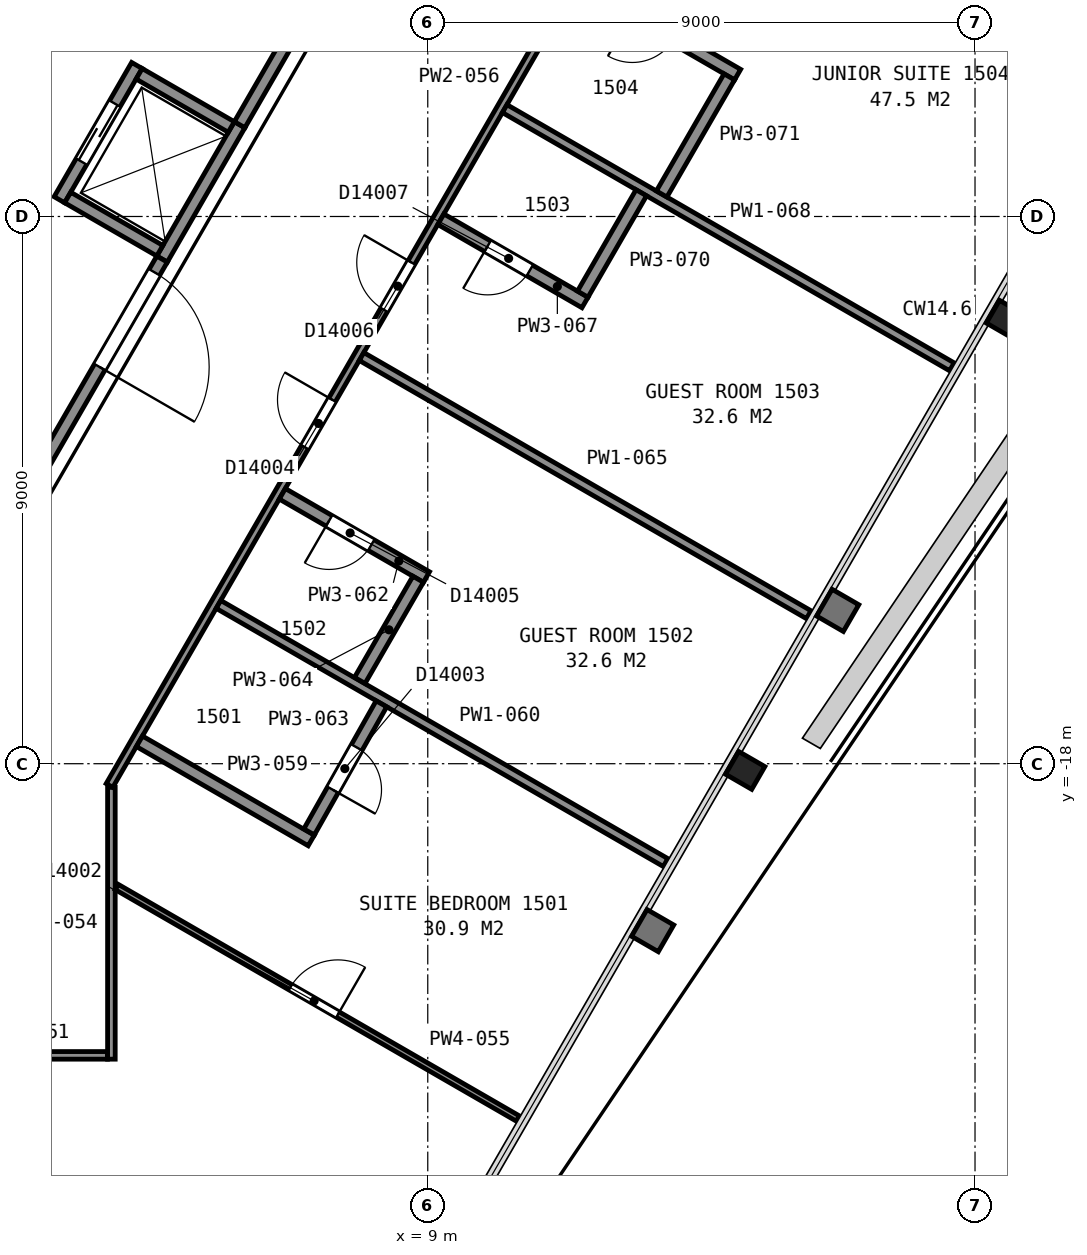
"""IFC4 building model, lengths in metres.
Left out: names, types, materials, properties, quantities, classifications, styles, units other than length and angle.
Written with IfcOpenShell. Run it as: python <this file> out.ifc"""

import sys

from ifc_helpers import new_model, si_unit, direction, frame, frame_2d, origin, origin_2d, place, context, subcontext, project, spatial, rectangle, i_section, extrude, element, fill, save


model = new_model("IFC4")
c1 = context("Model", 3, precision=1e-05, world=origin(), true_north=direction((0.0, 1.0)))
c2 = subcontext(c1, "Body", "Model", "MODEL_VIEW")
j1 = project(units=[si_unit("LENGTHUNIT", "METRE"), si_unit("PLANEANGLEUNIT", "RADIAN")], contexts=[c1])
p1 = place(None, origin())
s1 = spatial("IfcSite", under=j1, at=p1, CompositionType="ELEMENT")
p2 = place(p1, origin())
s2 = spatial("IfcBuilding", under=s1, at=p2, CompositionType="ELEMENT")
p3 = place(p2, frame((0.0, 0.0, 69.2)))
s3 = spatial("IfcBuildingStorey", under=s2, at=p3, CompositionType="ELEMENT", Elevation=69.2)
for number, where, z_axis, x_axis in (
    (1, (14.22, -18.11, 0.0), (0.0, 0.0, 1.0), (-0.5, -0.866, 0.0)),
    (2, (18.51, -10.69, 0.0), (0.0, 0.0, 1.0), (-0.5, -0.866, 0.0)),
):
    element("IfcColumn", number, at=place(p3, frame(where, z_axis=z_axis, x_axis=x_axis)), inside=s3, PredefinedType="COLUMN", context=c2, shape_type="SweptSolid", body=[
        extrude(i_section(OverallWidth=0.432, OverallDepth=0.498, WebThickness=0.056, FlangeThickness=0.089, FilletRadius=0.015, at=origin_2d()), origin(), (0.0, 0.0, 1.0), 3.575),
    ])
p4 = place(p3, frame((4.63, -9.7, 0.0), z_axis=(0.0, 0.0, 1.0), x_axis=(0.500062241894, 0.865989465428, 0.0)))
e3 = element("IfcWall", 3, at=p4, inside=s3, PredefinedType="PARTITIONING", context=c2, shape_type="SweptSolid", body=[
    extrude(rectangle(XDim=2.55, YDim=0.2, at=frame_2d((1.275, 0.0))), origin(), (0.0, 0.0, 1.0), 3.6),
])
p5 = place(p3, frame((2.942, -8.725, 0.0), z_axis=(0.0, 0.0, 1.0), x_axis=(0.500020783669, 0.866013403995, 0.0)))
e4 = element("IfcWall", 4, at=p5, inside=s3, PredefinedType="PARTITIONING", context=c2, shape_type="SweptSolid", body=[
    extrude(rectangle(XDim=2.55, YDim=0.2, at=frame_2d((1.275, 0.0))), origin(), (0.0, 0.0, 1.0), 3.6),
])
p6 = place(p5, frame((0.725, 0.0, 0.0)))
e5 = element("IfcOpeningElement", 5, at=p6, cuts=e4, PredefinedType="OPENING", context=c2, shape_type="SweptSolid", body=[
    extrude(rectangle(XDim=1.1, YDim=2.1, at=frame_2d((0.55, 1.05))), frame((0.0, 0.11, 0.0), z_axis=(0.0, -1.0, 0.0), x_axis=(1.0, 0.0, 0.0)), (0.0, 0.0, 1.0), 0.22),
])
p7 = place(p3, frame((5.769, -7.528, 0.0), z_axis=(0.0, 0.0, 1.0), x_axis=(-0.866002029911, 0.500040482552, 0.0)))
e6 = element("IfcWall", 6, at=p7, inside=s3, PredefinedType="PARTITIONING", context=c2, shape_type="SweptSolid", body=[
    extrude(rectangle(XDim=1.75, YDim=0.2, at=frame_2d((0.875, 0.0))), origin(), (0.0, 0.0, 1.0), 3.6),
])
p8 = place(p3, frame((4.594, -9.563, 0.0), z_axis=(0.0, 0.0, 1.0), x_axis=(-0.866036909293, 0.499980071345, 0.0)))
e7 = element("IfcWall", 7, at=p8, inside=s3, PredefinedType="PARTITIONING", context=c2, shape_type="SweptSolid", body=[
    extrude(rectangle(XDim=1.75, YDim=0.2, at=frame_2d((0.875, 0.0))), origin(), (0.0, 0.0, 1.0), 3.6),
])
p9 = place(p3, frame((1.677, -14.815, 0.0), z_axis=(0.0, 0.0, 1.0), x_axis=(0.49999445743, 0.866028603765, 0.0)))
e8 = element("IfcWall", 8, at=p9, inside=s3, PredefinedType="PARTITIONING", context=c2, shape_type="SweptSolid", body=[
    extrude(rectangle(XDim=5.905, YDim=0.2, at=frame_2d((2.952, 0.0))), origin(), (0.0, 0.0, 1.0), 3.35),
])
p10 = place(p9, frame((3.855, 0.0, 0.0)))
e9 = element("IfcOpeningElement", 9, at=p10, cuts=e8, PredefinedType="OPENING", context=c2, shape_type="SweptSolid", body=[
    extrude(rectangle(XDim=1.8, YDim=2.1, at=frame_2d((0.9, 1.05))), frame((0.0, 0.11, 0.0), z_axis=(0.0, -1.0, 0.0), x_axis=(1.0, 0.0, 0.0)), (0.0, 0.0, 1.0), 0.22),
])
p11 = place(p3, frame((5.906, -7.49, 0.0), z_axis=(0.0, 0.0, 1.0), x_axis=(0.500252727967, 0.865879442048, 0.0)))
e10 = element("IfcWall", 10, at=p11, inside=s3, PredefinedType="PARTITIONING", context=c2, shape_type="SweptSolid", body=[
    extrude(rectangle(XDim=2.617, YDim=0.2, at=frame_2d((1.309, 0.0))), origin(), (0.0, 0.0, 1.0), 3.35),
])
p12 = place(p3, frame((1.14, -22.797, 0.0), z_axis=(0.0, 0.0, 1.0), x_axis=(1.0, 0.0, 0.0)))
e11 = element("IfcWall", 11, at=p12, inside=s3, PredefinedType="PARTITIONING", context=c2, shape_type="SweptSolid", body=[
    extrude(rectangle(XDim=2.592, YDim=0.125, at=frame_2d((1.296, 0.0))), origin(), (0.0, 0.0, 1.0), 2.613),
])
p13 = place(p3, frame((3.797, -22.86, 0.0), z_axis=(0.0, 0.0, 1.0), x_axis=(0.0, 1.0, 0.0)))
e12 = element("IfcWall", 12, at=p13, inside=s3, PredefinedType="PARTITIONING", context=c2, shape_type="SweptSolid", body=[
    extrude(rectangle(XDim=4.471, YDim=0.125, at=frame_2d((2.235, 0.0))), origin(), (0.0, 0.0, 1.0), 2.613),
])
p14 = place(p3, frame((3.885, -20.028, 0.0), z_axis=(0.0, 0.0, 1.0), x_axis=(0.866080975745, -0.499903734186, 0.0)))
e13 = element("IfcWall", 13, at=p14, inside=s3, PredefinedType="PARTITIONING", context=c2, shape_type="SweptSolid", body=[
    extrude(rectangle(XDim=7.617, YDim=0.1, at=frame_2d((3.808, 0.0))), origin(), (0.0, 0.0, 1.0), 2.613),
])
p15 = place(p14, frame((3.299, 0.0, 0.0)))
e14 = element("IfcOpeningElement", 14, at=p15, cuts=e13, PredefinedType="OPENING", context=c2, shape_type="SweptSolid", body=[
    extrude(rectangle(XDim=0.9, YDim=2.1, at=frame_2d((0.45, 1.05))), frame((0.0, 0.06, 0.0), z_axis=(0.0, -1.0, 0.0), x_axis=(1.0, 0.0, 0.0)), (0.0, 0.0, 1.0), 0.12),
])
p16 = place(p3, frame((18.179, 6.606, 0.0), z_axis=(0.0, 0.0, 1.0), x_axis=(-0.500003973642, -0.866023109589, 0.0)))
e15 = element("IfcWall", 15, at=p16, inside=s3, PredefinedType="PARTITIONING", context=c2, shape_type="SweptSolid", body=[
    extrude(rectangle(XDim=28.826, YDim=0.125, at=frame_2d((14.413, 0.0))), origin(), (0.0, 0.0, 1.0), 2.613),
])
p17 = place(p16, frame((21.501, 0.0, 0.0)))
e16 = element("IfcOpeningElement", 16, at=p17, cuts=e15, PredefinedType="OPENING", context=c2, shape_type="SweptSolid", body=[
    extrude(rectangle(XDim=0.9, YDim=2.1, at=frame_2d((0.45, 1.05))), frame((0.0, 0.073, 0.0), z_axis=(0.0, -1.0, 0.0), x_axis=(1.0, 0.0, 0.0)), (0.0, 0.0, 1.0), 0.145),
])
p18 = place(p16, frame((18.894, 0.0, 0.0)))
e17 = element("IfcOpeningElement", 17, at=p18, cuts=e15, PredefinedType="OPENING", context=c2, shape_type="SweptSolid", body=[
    extrude(rectangle(XDim=0.9, YDim=2.1, at=frame_2d((0.45, 1.05))), frame((0.0, 0.073, 0.0), z_axis=(0.0, -1.0, 0.0), x_axis=(1.0, 0.0, 0.0)), (0.0, 0.0, 1.0), 0.145),
])
p19 = place(p16, frame((10.937, 0.0, 0.0)))
e18 = element("IfcOpeningElement", 18, at=p19, cuts=e15, PredefinedType="OPENING", context=c2, shape_type="SweptSolid", body=[
    extrude(rectangle(XDim=0.9, YDim=2.1, at=frame_2d((0.45, 1.05))), frame((0.0, 0.073, 0.0), z_axis=(0.0, -1.0, 0.0), x_axis=(1.0, 0.0, 0.0)), (0.0, 0.0, 1.0), 0.145),
])
p20 = place(p16, frame((7.535, 0.0, 0.0)))
e19 = element("IfcOpeningElement", 19, at=p20, cuts=e15, PredefinedType="OPENING", context=c2, shape_type="SweptSolid", body=[
    extrude(rectangle(XDim=0.9, YDim=2.1, at=frame_2d((0.45, 1.05))), frame((0.0, 0.073, 0.0), z_axis=(0.0, -1.0, 0.0), x_axis=(1.0, 0.0, 0.0)), (0.0, 0.0, 1.0), 0.145),
])
p21 = place(p16, frame((0.827, 0.0, 0.0)))
e20 = element("IfcOpeningElement", 20, at=p21, cuts=e15, PredefinedType="OPENING", context=c2, shape_type="SweptSolid", body=[
    extrude(rectangle(XDim=0.9, YDim=2.1, at=frame_2d((0.45, 1.05))), frame((0.0, 0.073, 0.0), z_axis=(0.0, -1.0, 0.0), x_axis=(1.0, 0.0, 0.0)), (0.0, 0.0, 1.0), 0.145),
])
p22 = place(p3, frame((4.258, -17.631, 0.0), z_axis=(0.0, 0.0, 1.0), x_axis=(0.865982457891, -0.500074377092, 0.0)))
e21 = element("IfcWall", 21, at=p22, inside=s3, PredefinedType="PARTITIONING", context=c2, shape_type="SweptSolid", body=[
    extrude(rectangle(XDim=3.263, YDim=0.2, at=frame_2d((1.631, 0.0))), origin(), (0.0, 0.0, 1.0), 2.613),
])
p23 = place(p3, frame((5.558, -15.38, 0.0), z_axis=(0.0, 0.0, 1.0), x_axis=(0.866022790583, -0.50000452617, 0.0)))
e22 = element("IfcWall", 22, at=p23, inside=s3, PredefinedType="PARTITIONING", context=c2, shape_type="SweptSolid", body=[
    extrude(rectangle(XDim=8.491, YDim=0.15, at=frame_2d((4.246, 0.0))), origin(), (0.0, 0.0, 1.0), 2.613),
])
p24 = place(p3, frame((8.979, -14.93, 0.0), z_axis=(0.0, 0.0, 1.0), x_axis=(-0.866005850709, 0.50003386539, 0.0)))
e23 = element("IfcWall", 23, at=p24, inside=s3, PredefinedType="PARTITIONING", context=c2, shape_type="SweptSolid", body=[
    extrude(rectangle(XDim=2.737, YDim=0.2, at=frame_2d((1.369, 0.0))), origin(), (0.0, 0.0, 1.0), 2.613),
])
p25 = place(p24, frame((1.05, 0.0, 0.0)))
e24 = element("IfcOpeningElement", 24, at=p25, cuts=e23, PredefinedType="OPENING", context=c2, shape_type="SweptSolid", body=[
    extrude(rectangle(XDim=0.8, YDim=2.1, at=frame_2d((0.4, 1.05))), frame((0.0, 0.11, 0.0), z_axis=(0.0, -1.0, 0.0), x_axis=(1.0, 0.0, 0.0)), (0.0, 0.0, 1.0), 0.22),
])
p26 = place(p3, frame((7.049, -19.122, 0.0), z_axis=(0.0, 0.0, 1.0), x_axis=(0.491544985814, 0.870852184312, 0.0)))
e25 = element("IfcWall", 25, at=p26, inside=s3, PredefinedType="PARTITIONING", context=c2, shape_type="SweptSolid", body=[
    extrude(rectangle(XDim=2.419, YDim=0.2, at=frame_2d((1.209, 0.0))), origin(), (0.0, 0.0, 1.0), 2.613),
])
p27 = place(p26, frame((0.795, 0.0, 0.0)))
e26 = element("IfcOpeningElement", 26, at=p27, cuts=e25, PredefinedType="OPENING", context=c2, shape_type="SweptSolid", body=[
    extrude(rectangle(XDim=0.8, YDim=2.1, at=frame_2d((0.4, 1.05))), frame((0.0, 0.11, 0.0), z_axis=(0.0, -1.0, 0.0), x_axis=(1.0, 0.0, 0.0)), (0.0, 0.0, 1.0), 0.22),
])
p28 = place(p3, frame((7.882, -16.63, 0.0), z_axis=(0.0, 0.0, 1.0), x_axis=(0.499913221443, 0.866075499611, 0.0)))
e27 = element("IfcWall", 27, at=p28, inside=s3, PredefinedType="PARTITIONING", context=c2, shape_type="SweptSolid", body=[
    extrude(rectangle(XDim=1.92, YDim=0.2, at=frame_2d((0.96, 0.0))), origin(), (0.0, 0.0, 1.0), 2.613),
])
p29 = place(p3, frame((7.911, -11.303, 0.0), z_axis=(0.0, 0.0, 1.0), x_axis=(0.866012267213, -0.500022752519, 0.0)))
e28 = element("IfcWall", 28, at=p29, inside=s3, PredefinedType="PARTITIONING", context=c2, shape_type="SweptSolid", body=[
    extrude(rectangle(XDim=8.492, YDim=0.15, at=frame_2d((4.246, 0.0))), origin(), (0.0, 0.0, 1.0), 2.613),
])
p30 = place(p3, frame((9.215, -9.045, 0.0), z_axis=(0.0, 0.0, 1.0), x_axis=(0.865989529477, -0.500062130976, 0.0)))
e29 = element("IfcWall", 29, at=p30, inside=s3, PredefinedType="PARTITIONING", context=c2, shape_type="SweptSolid", body=[
    extrude(rectangle(XDim=2.738, YDim=0.2, at=frame_2d((1.369, 0.0))), origin(), (0.0, 0.0, 1.0), 2.613),
])
p31 = place(p30, frame((0.887, 0.0, 0.0)))
e30 = element("IfcOpeningElement", 30, at=p31, cuts=e29, PredefinedType="OPENING", context=c2, shape_type="SweptSolid", body=[
    extrude(rectangle(XDim=0.8, YDim=2.1, at=frame_2d((0.4, 1.05))), frame((0.0, 0.11, 0.0), z_axis=(0.0, -1.0, 0.0), x_axis=(1.0, 0.0, 0.0)), (0.0, 0.0, 1.0), 0.22),
])
p32 = place(p3, frame((10.265, -7.226, 0.0), z_axis=(0.0, 0.0, 1.0), x_axis=(0.866024716685, -0.500001190089, 0.0)))
e31 = element("IfcWall", 31, at=p32, inside=s3, PredefinedType="PARTITIONING", context=c2, shape_type="SweptSolid", body=[
    extrude(rectangle(XDim=8.492, YDim=0.15, at=frame_2d((4.246, 0.0))), origin(), (0.0, 0.0, 1.0), 2.613),
])
p33 = place(p3, frame((14.096, -6.667, 0.0), z_axis=(0.0, 0.0, 1.0), x_axis=(-0.866023634079, 0.500003065207, 0.0)))
e32 = element("IfcWall", 32, at=p33, inside=s3, PredefinedType="PARTITIONING", context=c2, shape_type="SweptSolid", body=[
    extrude(rectangle(XDim=3.038, YDim=0.2, at=frame_2d((1.519, 0.0))), origin(), (0.0, 0.0, 1.0), 2.613),
])
p34 = place(p33, frame((1.2, 0.0, 0.0)))
e33 = element("IfcOpeningElement", 33, at=p34, cuts=e32, PredefinedType="OPENING", context=c2, shape_type="SweptSolid", body=[
    extrude(rectangle(XDim=0.8, YDim=2.1, at=frame_2d((0.4, 1.05))), frame((0.0, 0.11, 0.0), z_axis=(0.0, -1.0, 0.0), x_axis=(1.0, 0.0, 0.0)), (0.0, 0.0, 1.0), 0.22),
])
p35 = place(p3, frame((11.549, -10.277, 0.0), z_axis=(0.0, 0.0, 1.0), x_axis=(0.499876134923, 0.86609690551, 0.0)))
e34 = element("IfcWall", 34, at=p35, inside=s3, PredefinedType="PARTITIONING", context=c2, shape_type="SweptSolid", body=[
    extrude(rectangle(XDim=1.925, YDim=0.2, at=frame_2d((0.963, 0.0))), origin(), (0.0, 0.0, 1.0), 2.613),
])
p36 = place(p3, frame((12.846, -8.63, 0.0), z_axis=(0.0, 0.0, 1.0), x_axis=(0.500092923031, 0.865971748, 0.0)))
e35 = element("IfcWall", 35, at=p36, inside=s3, PredefinedType="PARTITIONING", context=c2, shape_type="SweptSolid", body=[
    extrude(rectangle(XDim=2.225, YDim=0.2, at=frame_2d((1.112, 0.0))), origin(), (0.0, 0.0, 1.0), 2.613),
])
p37 = place(p6, origin())
e36 = element("IfcDoor", 36, at=p37, inside=s3, OperationType="SLIDING_TO_RIGHT", PredefinedType="DOOR", context=c2, shape_type="SweptSolid", body=[
    extrude(rectangle(XDim=1.1, YDim=2.1, at=frame_2d((0.55, 1.05))), frame((0.0, 0.025, 0.0), z_axis=(0.0, -1.0, 0.0), x_axis=(1.0, 0.0, 0.0)), (0.0, 0.0, 1.0), 0.05),
])
fill(e5, e36)
p38 = place(p10, origin())
e37 = element("IfcDoor", 37, at=p38, inside=s3, OperationType="DOUBLE_DOOR_SINGLE_SWING", PredefinedType="DOOR", context=c2, shape_type="SweptSolid", body=[
    extrude(rectangle(XDim=1.8, YDim=2.1, at=frame_2d((0.9, 1.05))), frame((0.0, 0.025, 0.0), z_axis=(0.0, -1.0, 0.0), x_axis=(1.0, 0.0, 0.0)), (0.0, 0.0, 1.0), 0.05),
])
fill(e9, e37)
p39 = place(p15, origin())
e38 = element("IfcDoor", 38, at=p39, inside=s3, OperationType="SINGLE_SWING_RIGHT", PredefinedType="DOOR", context=c2, shape_type="SweptSolid", body=[
    extrude(rectangle(XDim=0.9, YDim=2.1, at=frame_2d((0.45, 1.05))), frame((0.0, 0.025, 0.0), z_axis=(0.0, -1.0, 0.0), x_axis=(1.0, 0.0, 0.0)), (0.0, 0.0, 1.0), 0.05),
])
fill(e14, e38)
p40 = place(p17, origin())
e39 = element("IfcDoor", 39, at=p40, inside=s3, OperationType="SINGLE_SWING_LEFT", PredefinedType="DOOR", context=c2, shape_type="SweptSolid", body=[
    extrude(rectangle(XDim=0.9, YDim=2.1, at=frame_2d((0.45, 1.05))), frame((0.0, 0.025, 0.0), z_axis=(0.0, -1.0, 0.0), x_axis=(1.0, 0.0, 0.0)), (0.0, 0.0, 1.0), 0.05),
])
fill(e16, e39)
p41 = place(p18, origin())
e40 = element("IfcDoor", 40, at=p41, inside=s3, OperationType="SINGLE_SWING_LEFT", PredefinedType="DOOR", context=c2, shape_type="SweptSolid", body=[
    extrude(rectangle(XDim=0.9, YDim=2.1, at=frame_2d((0.45, 1.05))), frame((0.0, 0.025, 0.0), z_axis=(0.0, -1.0, 0.0), x_axis=(1.0, 0.0, 0.0)), (0.0, 0.0, 1.0), 0.05),
])
fill(e17, e40)
p42 = place(p25, origin())
e41 = element("IfcDoor", 41, at=p42, inside=s3, OperationType="SINGLE_SWING_RIGHT", PredefinedType="DOOR", context=c2, shape_type="SweptSolid", body=[
    extrude(rectangle(XDim=0.8, YDim=2.1, at=frame_2d((0.4, 1.05))), frame((0.0, 0.025, 0.0), z_axis=(0.0, -1.0, 0.0), x_axis=(1.0, 0.0, 0.0)), (0.0, 0.0, 1.0), 0.05),
])
fill(e24, e41)
p43 = place(p27, origin())
e42 = element("IfcDoor", 42, at=p43, inside=s3, OperationType="SINGLE_SWING_LEFT", PredefinedType="DOOR", context=c2, shape_type="SweptSolid", body=[
    extrude(rectangle(XDim=0.8, YDim=2.1, at=frame_2d((0.4, 1.05))), frame((0.0, 0.025, 0.0), z_axis=(0.0, -1.0, 0.0), x_axis=(1.0, 0.0, 0.0)), (0.0, 0.0, 1.0), 0.05),
])
fill(e26, e42)
p44 = place(p31, origin())
e43 = element("IfcDoor", 43, at=p44, inside=s3, OperationType="SINGLE_SWING_LEFT", PredefinedType="DOOR", context=c2, shape_type="SweptSolid", body=[
    extrude(rectangle(XDim=0.8, YDim=2.1, at=frame_2d((0.4, 1.05))), frame((0.0, 0.025, 0.0), z_axis=(0.0, -1.0, 0.0), x_axis=(1.0, 0.0, 0.0)), (0.0, 0.0, 1.0), 0.05),
])
fill(e30, e43)
save(model, sys.argv[1])
